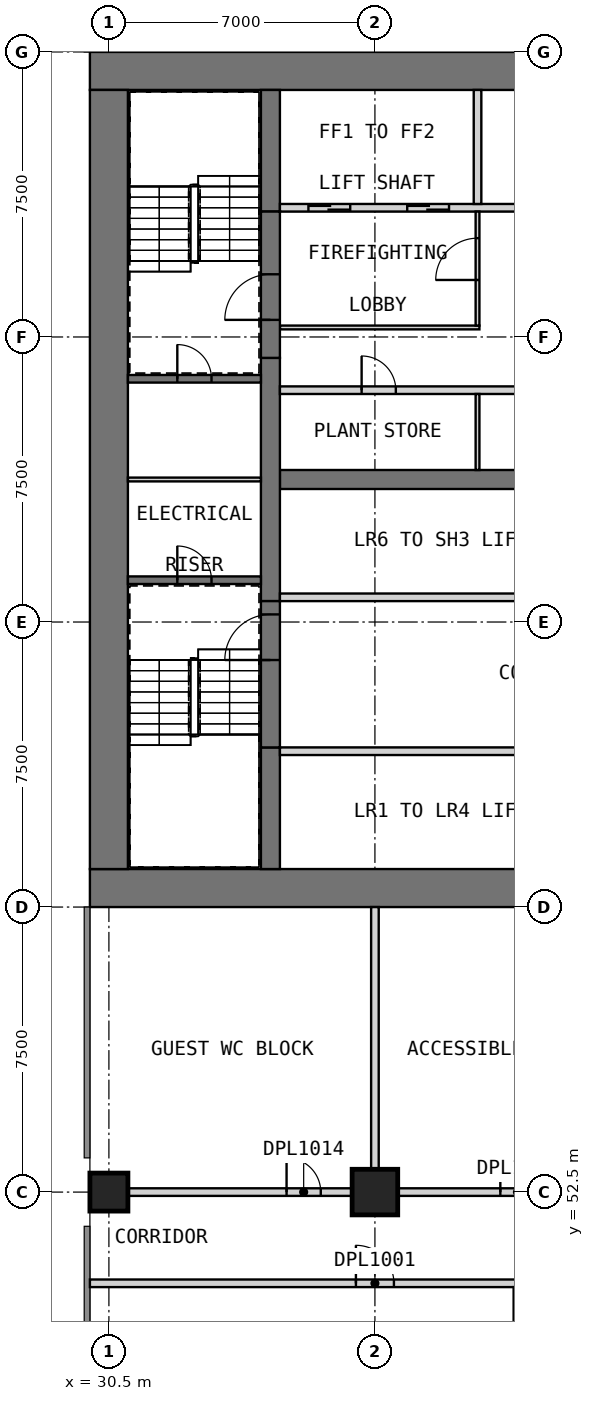
"""IFC4 building model, lengths in metres.
Left out: names, types, materials, properties, quantities, classifications, styles, units other than length and angle.
Written with IfcOpenShell. Run it as: python <this file> out.ifc"""

import sys

from ifc_helpers import new_model, si_unit, direction, frame, frame_2d, origin, origin_2d, place, context, subcontext, project, spatial, rectangle, extrude, element, fill, save


model = new_model("IFC4")
c1 = context("Model", 3, precision=1e-05, world=origin(), true_north=direction((0.0, 1.0)))
c2 = subcontext(c1, "Body", "Model", "MODEL_VIEW")
j1 = project(units=[si_unit("LENGTHUNIT", "METRE"), si_unit("PLANEANGLEUNIT", "RADIAN")], contexts=[c1])
p1 = place(None, origin())
s1 = spatial("IfcSite", under=j1, at=p1, CompositionType="ELEMENT")
p2 = place(p1, origin())
s2 = spatial("IfcBuilding", under=s1, at=p2, CompositionType="ELEMENT")
p3 = place(p2, frame((0.0, 0.0, 73.6)))
s3 = spatial("IfcBuildingStorey", under=s2, at=p3, CompositionType="ELEMENT", Elevation=73.6)
p4 = place(p3, frame((30.5, 52.5, 0.0), z_axis=(0.0, 0.0, 1.0), x_axis=(1.0, 0.0, 0.0)))
e1 = element("IfcColumn", 1, at=p4, inside=s3, PredefinedType="COLUMN", context=c2, shape_type="SweptSolid", body=[
    extrude(rectangle(XDim=1.0, YDim=1.0, at=origin_2d()), origin(), (0.0, 0.0, 1.0), 5.5),
])
p5 = place(p3, frame((37.5, 52.5, 0.0), z_axis=(0.0, 0.0, 1.0), x_axis=(1.0, 0.0, 0.0)))
e2 = element("IfcColumn", 2, at=p5, inside=s3, PredefinedType="COLUMN", context=c2, shape_type="SweptSolid", body=[
    extrude(rectangle(XDim=1.2, YDim=1.2, at=origin_2d()), origin(), (0.0, 0.0, 1.0), 5.5),
])
p6 = place(p3, frame((30.0, 60.5, 0.0), z_axis=(0.0, 0.0, 1.0), x_axis=(1.0, 0.0, 0.0)))
e3 = element("IfcWall", 3, at=p6, inside=s3, PredefinedType="SHEAR", context=c2, shape_type="SweptSolid", body=[
    extrude(rectangle(XDim=30.0, YDim=1.0, at=frame_2d((15.0, 0.0))), origin(), (0.0, 0.0, 1.0), 5.5),
])
p7 = place(p6, frame((21.9, 0.0, 0.0)))
e4 = element("IfcOpeningElement", 4, at=p7, cuts=e3, PredefinedType="OPENING", context=c2, shape_type="SweptSolid", body=[
    extrude(rectangle(XDim=1.8, YDim=2.1, at=frame_2d((0.9, 1.05))), frame((0.0, 0.51, 0.0), z_axis=(0.0, -1.0, 0.0), x_axis=(1.0, 0.0, 0.0)), (0.0, 0.0, 1.0), 1.02),
])
p8 = place(p6, frame((26.5, 0.0, 0.0)))
e5 = element("IfcOpeningElement", 5, at=p8, cuts=e3, PredefinedType="OPENING", context=c2, shape_type="SweptSolid", body=[
    extrude(rectangle(XDim=1.2, YDim=2.1, at=frame_2d((0.6, 1.05))), frame((0.0, 0.51, 0.0), z_axis=(0.0, -1.0, 0.0), x_axis=(1.0, 0.0, 0.0)), (0.0, 0.0, 1.0), 1.02),
])
p9 = place(p3, frame((30.0, 82.0, 0.0), z_axis=(0.0, 0.0, 1.0), x_axis=(1.0, 0.0, 0.0)))
e6 = element("IfcWall", 6, at=p9, inside=s3, PredefinedType="SHEAR", context=c2, shape_type="SweptSolid", body=[
    extrude(rectangle(XDim=30.0, YDim=1.0, at=frame_2d((15.0, 0.0))), origin(), (0.0, 0.0, 1.0), 5.5),
])
p10 = place(p3, frame((30.5, 61.0, 0.0), z_axis=(0.0, 0.0, 1.0), x_axis=(0.0, 1.0, 0.0)))
e7 = element("IfcWall", 7, at=p10, inside=s3, PredefinedType="SHEAR", context=c2, shape_type="SweptSolid", body=[
    extrude(rectangle(XDim=20.5, YDim=1.0, at=frame_2d((10.25, 0.0))), origin(), (0.0, 0.0, 1.0), 5.5),
])
p11 = place(p3, frame((35.0, 71.25, 0.0), z_axis=(0.0, 0.0, 1.0), x_axis=(1.0, 0.0, 0.0)))
e8 = element("IfcWall", 8, at=p11, inside=s3, PredefinedType="SHEAR", context=c2, shape_type="SweptSolid", body=[
    extrude(rectangle(XDim=15.6, YDim=0.5, at=frame_2d((7.8, 0.0))), origin(), (0.0, 0.0, 1.0), 5.5),
])
p12 = place(p3, frame((34.75, 61.0, 0.0), z_axis=(0.0, 0.0, 1.0), x_axis=(0.0, 1.0, 0.0)))
e9 = element("IfcWall", 9, at=p12, inside=s3, PredefinedType="SHEAR", context=c2, shape_type="SweptSolid", body=[
    extrude(rectangle(XDim=3.2, YDim=0.5, at=frame_2d((1.6, 0.0))), origin(), (0.0, 0.0, 1.0), 5.5),
])
p13 = place(p3, frame((34.75, 68.05, 0.0), z_axis=(0.0, 0.0, 1.0), x_axis=(0.0, 1.0, 0.0)))
e10 = element("IfcWall", 10, at=p13, inside=s3, PredefinedType="SHEAR", context=c2, shape_type="SweptSolid", body=[
    extrude(rectangle(XDim=6.4, YDim=0.5, at=frame_2d((3.2, 0.0))), origin(), (0.0, 0.0, 1.0), 5.5),
])
p14 = place(p3, frame((34.75, 78.3, 0.0), z_axis=(0.0, 0.0, 1.0), x_axis=(0.0, 1.0, 0.0)))
e11 = element("IfcWall", 11, at=p14, inside=s3, PredefinedType="SHEAR", context=c2, shape_type="SweptSolid", body=[
    extrude(rectangle(XDim=3.2, YDim=0.5, at=frame_2d((1.6, 0.0))), origin(), (0.0, 0.0, 1.0), 5.5),
])
p15 = place(p2, frame((0.0, 0.0, 34.0)))
s4 = spatial("IfcBuildingStorey", under=s2, at=p15, CompositionType="ELEMENT", Elevation=34.0)
for number, where, z_axis, x_axis in (
    (12, (29.7, 61.05, 0.0), (0.0, 0.0, 1.0), (0.0, 1.0, 0.0)),
    (13, (29.7, 65.925, 0.0), (0.0, 0.0, 1.0), (0.0, 1.0, 0.0)),
    (14, (29.7, 70.8, 0.0), (0.0, 0.0, 1.0), (0.0, 1.0, 0.0)),
    (15, (29.7, 75.675, 0.0), (0.0, 0.0, 1.0), (0.0, 1.0, 0.0)),
    (16, (29.7, 80.55, 0.0), (0.0, 0.0, 1.0), (0.0, 1.0, 0.0)),
):
    element("IfcWall", number, at=place(p15, frame(where, z_axis=z_axis, x_axis=x_axis)), inside=s4, PredefinedType="SOLIDWALL", context=c2, shape_type="SweptSolid", body=[
        extrude(rectangle(XDim=0.9, YDim=0.6, at=frame_2d((0.45, 0.0))), origin(), (0.0, 0.0, 1.0), 286.2),
    ])
for number, where, z_axis, x_axis in (
    (17, (35.0, 64.1, 0.0), (0.0, 0.0, 1.0), (1.0, 0.0, 0.0)),
    (18, (35.0, 68.15, 0.0), (0.0, 0.0, 1.0), (1.0, 0.0, 0.0)),
):
    element("IfcWall", number, at=place(p3, frame(where, z_axis=z_axis, x_axis=x_axis)), inside=s3, PredefinedType="SOLIDWALL", context=c2, shape_type="SweptSolid", body=[
        extrude(rectangle(XDim=13.0, YDim=0.2, at=frame_2d((6.5, 0.0))), origin(), (0.0, 0.0, 1.0), 5.5),
    ])
p16 = place(p3, frame((35.0, 73.6, 0.0), z_axis=(0.0, 0.0, 1.0), x_axis=(1.0, 0.0, 0.0)))
e19 = element("IfcWall", 19, at=p16, inside=s3, PredefinedType="PARTITIONING", context=c2, shape_type="SweptSolid", body=[
    extrude(rectangle(XDim=15.6, YDim=0.2, at=frame_2d((7.8, 0.0))), origin(), (0.0, 0.0, 1.0), 5.25),
])
p17 = place(p16, frame((2.15, 0.0, 0.0)))
e20 = element("IfcOpeningElement", 20, at=p17, cuts=e19, PredefinedType="OPENING", context=c2, shape_type="SweptSolid", body=[
    extrude(rectangle(XDim=0.9, YDim=2.1, at=frame_2d((0.45, 1.05))), frame((0.0, 0.11, 0.0), z_axis=(0.0, -1.0, 0.0), x_axis=(1.0, 0.0, 0.0)), (0.0, 0.0, 1.0), 0.22),
])
p18 = place(p16, frame((9.95, 0.0, 0.0)))
e21 = element("IfcOpeningElement", 21, at=p18, cuts=e19, PredefinedType="OPENING", context=c2, shape_type="SweptSolid", body=[
    extrude(rectangle(XDim=0.9, YDim=2.1, at=frame_2d((0.45, 1.05))), frame((0.0, 0.11, 0.0), z_axis=(0.0, -1.0, 0.0), x_axis=(1.0, 0.0, 0.0)), (0.0, 0.0, 1.0), 0.22),
])
p19 = place(p3, frame((40.2, 71.5, 0.0), z_axis=(0.0, 0.0, 1.0), x_axis=(0.0, 1.0, 0.0)))
e22 = element("IfcWall", 22, at=p19, inside=s3, PredefinedType="PARTITIONING", context=c2, shape_type="SweptSolid", body=[
    extrude(rectangle(XDim=2.0, YDim=0.1, at=frame_2d((1.0, 0.0))), origin(), (0.0, 0.0, 1.0), 5.25),
])
p20 = place(p3, frame((35.0, 78.4, 0.0), z_axis=(0.0, 0.0, 1.0), x_axis=(1.0, 0.0, 0.0)))
e23 = element("IfcWall", 23, at=p20, inside=s3, PredefinedType="SOLIDWALL", context=c2, shape_type="SweptSolid", body=[
    extrude(rectangle(XDim=15.6, YDim=0.2, at=frame_2d((7.8, 0.0))), origin(), (0.0, 0.0, 1.0), 5.5),
])
p21 = place(p20, frame((0.75, 0.0, 0.0)))
e24 = element("IfcOpeningElement", 24, at=p21, cuts=e23, PredefinedType="OPENING", context=c2, shape_type="SweptSolid", body=[
    extrude(rectangle(XDim=1.1, YDim=2.1, at=frame_2d((0.55, 1.05))), frame((0.0, 0.11, 0.0), z_axis=(0.0, -1.0, 0.0), x_axis=(1.0, 0.0, 0.0)), (0.0, 0.0, 1.0), 0.22),
])
p22 = place(p20, frame((3.35, 0.0, 0.0)))
e25 = element("IfcOpeningElement", 25, at=p22, cuts=e23, PredefinedType="OPENING", context=c2, shape_type="SweptSolid", body=[
    extrude(rectangle(XDim=1.1, YDim=2.1, at=frame_2d((0.55, 1.05))), frame((0.0, 0.11, 0.0), z_axis=(0.0, -1.0, 0.0), x_axis=(1.0, 0.0, 0.0)), (0.0, 0.0, 1.0), 0.22),
])
p23 = place(p20, frame((11.15, 0.0, 0.0)))
e26 = element("IfcOpeningElement", 26, at=p23, cuts=e23, PredefinedType="OPENING", context=c2, shape_type="SweptSolid", body=[
    extrude(rectangle(XDim=1.1, YDim=2.1, at=frame_2d((0.55, 1.05))), frame((0.0, 0.11, 0.0), z_axis=(0.0, -1.0, 0.0), x_axis=(1.0, 0.0, 0.0)), (0.0, 0.0, 1.0), 0.22),
])
p24 = place(p20, frame((13.75, 0.0, 0.0)))
e27 = element("IfcOpeningElement", 27, at=p24, cuts=e23, PredefinedType="OPENING", context=c2, shape_type="SweptSolid", body=[
    extrude(rectangle(XDim=1.1, YDim=2.1, at=frame_2d((0.55, 1.05))), frame((0.0, 0.11, 0.0), z_axis=(0.0, -1.0, 0.0), x_axis=(1.0, 0.0, 0.0)), (0.0, 0.0, 1.0), 0.22),
])
p25 = place(p3, frame((40.2, 78.5, 0.0), z_axis=(0.0, 0.0, 1.0), x_axis=(0.0, 1.0, 0.0)))
e28 = element("IfcWall", 28, at=p25, inside=s3, PredefinedType="SOLIDWALL", context=c2, shape_type="SweptSolid", body=[
    extrude(rectangle(XDim=3.0, YDim=0.2, at=frame_2d((1.5, 0.0))), origin(), (0.0, 0.0, 1.0), 5.5),
])
p26 = place(p3, frame((35.0, 75.25, 0.0), z_axis=(0.0, 0.0, 1.0), x_axis=(1.0, 0.0, 0.0)))
e29 = element("IfcWall", 29, at=p26, inside=s3, PredefinedType="PARTITIONING", context=c2, shape_type="SweptSolid", body=[
    extrude(rectangle(XDim=5.25, YDim=0.1, at=frame_2d((2.625, 0.0))), origin(), (0.0, 0.0, 1.0), 5.25),
])
p27 = place(p3, frame((40.2, 75.3, 0.0), z_axis=(0.0, 0.0, 1.0), x_axis=(0.0, 1.0, 0.0)))
e30 = element("IfcWall", 30, at=p27, inside=s3, PredefinedType="PARTITIONING", context=c2, shape_type="SweptSolid", body=[
    extrude(rectangle(XDim=3.0, YDim=0.1, at=frame_2d((1.5, 0.0))), origin(), (0.0, 0.0, 1.0), 5.25),
])
p28 = place(p27, frame((1.2, 0.0, 0.0)))
e31 = element("IfcOpeningElement", 31, at=p28, cuts=e30, PredefinedType="OPENING", context=c2, shape_type="SweptSolid", body=[
    extrude(rectangle(XDim=1.1, YDim=2.1, at=frame_2d((0.55, 1.05))), frame((0.0, 0.06, 0.0), z_axis=(0.0, -1.0, 0.0), x_axis=(1.0, 0.0, 0.0)), (0.0, 0.0, 1.0), 0.12),
])
p29 = place(p3, frame((34.75, 64.2, 0.0), z_axis=(0.0, 0.0, 1.0), x_axis=(0.0, 1.0, 0.0)))
e32 = element("IfcWall", 32, at=p29, inside=s3, PredefinedType="SOLIDWALL", context=c2, shape_type="SweptSolid", body=[
    extrude(rectangle(XDim=3.85, YDim=0.5, at=frame_2d((1.925, 0.0))), origin(), (0.0, 0.0, 1.0), 4.3),
])
p30 = place(p29, frame((2.3, 0.0, 0.0)))
e33 = element("IfcOpeningElement", 33, at=p30, cuts=e32, PredefinedType="OPENING", context=c2, shape_type="SweptSolid", body=[
    extrude(rectangle(XDim=1.2, YDim=2.1, at=frame_2d((0.6, 1.05))), frame((0.0, 0.26, 0.0), z_axis=(0.0, -1.0, 0.0), x_axis=(1.0, 0.0, 0.0)), (0.0, 0.0, 1.0), 0.52),
])
p31 = place(p3, frame((34.75, 74.45, 0.0), z_axis=(0.0, 0.0, 1.0), x_axis=(0.0, 1.0, 0.0)))
e34 = element("IfcWall", 34, at=p31, inside=s3, PredefinedType="SOLIDWALL", context=c2, shape_type="SweptSolid", body=[
    extrude(rectangle(XDim=3.85, YDim=0.5, at=frame_2d((1.925, 0.0))), origin(), (0.0, 0.0, 1.0), 4.3),
])
p32 = place(p31, frame((1.0, 0.0, 0.0)))
e35 = element("IfcOpeningElement", 35, at=p32, cuts=e34, PredefinedType="OPENING", context=c2, shape_type="SweptSolid", body=[
    extrude(rectangle(XDim=1.2, YDim=2.1, at=frame_2d((0.6, 1.05))), frame((0.0, 0.26, 0.0), z_axis=(0.0, -1.0, 0.0), x_axis=(1.0, 0.0, 0.0)), (0.0, 0.0, 1.0), 0.52),
])
p33 = place(p3, frame((31.0, 68.6, 0.0), z_axis=(0.0, 0.0, 1.0), x_axis=(1.0, 0.0, 0.0)))
e36 = element("IfcWall", 36, at=p33, inside=s3, PredefinedType="SOLIDWALL", context=c2, shape_type="SweptSolid", body=[
    extrude(rectangle(XDim=3.5, YDim=0.2, at=frame_2d((1.75, 0.0))), origin(), (0.0, 0.0, 1.0), 5.25),
])
p34 = place(p33, frame((1.3, 0.0, 0.0)))
e37 = element("IfcOpeningElement", 37, at=p34, cuts=e36, PredefinedType="OPENING", context=c2, shape_type="SweptSolid", body=[
    extrude(rectangle(XDim=0.9, YDim=2.1, at=frame_2d((0.45, 1.05))), frame((0.0, 0.11, 0.0), z_axis=(0.0, -1.0, 0.0), x_axis=(1.0, 0.0, 0.0)), (0.0, 0.0, 1.0), 0.22),
])
p35 = place(p3, frame((31.0, 73.9, 0.0), z_axis=(0.0, 0.0, 1.0), x_axis=(1.0, 0.0, 0.0)))
e38 = element("IfcWall", 38, at=p35, inside=s3, PredefinedType="SOLIDWALL", context=c2, shape_type="SweptSolid", body=[
    extrude(rectangle(XDim=3.5, YDim=0.2, at=frame_2d((1.75, 0.0))), origin(), (0.0, 0.0, 1.0), 5.25),
])
p36 = place(p35, frame((1.3, 0.0, 0.0)))
e39 = element("IfcOpeningElement", 39, at=p36, cuts=e38, PredefinedType="OPENING", context=c2, shape_type="SweptSolid", body=[
    extrude(rectangle(XDim=0.9, YDim=2.1, at=frame_2d((0.45, 1.05))), frame((0.0, 0.11, 0.0), z_axis=(0.0, -1.0, 0.0), x_axis=(1.0, 0.0, 0.0)), (0.0, 0.0, 1.0), 0.22),
])
p37 = place(p3, frame((31.0, 71.25, 0.0), z_axis=(0.0, 0.0, 1.0), x_axis=(1.0, 0.0, 0.0)))
e40 = element("IfcWall", 40, at=p37, inside=s3, PredefinedType="PARTITIONING", context=c2, shape_type="SweptSolid", body=[
    extrude(rectangle(XDim=3.5, YDim=0.1, at=frame_2d((1.75, 0.0))), origin(), (0.0, 0.0, 1.0), 5.25),
])
p38 = place(p3, frame((30.0, 50.1, 0.0), z_axis=(0.0, 0.0, 1.0), x_axis=(1.0, 0.0, 0.0)))
e41 = element("IfcWall", 41, at=p38, inside=s3, PredefinedType="PARTITIONING", context=c2, shape_type="SweptSolid", body=[
    extrude(rectangle(XDim=47.4, YDim=0.2, at=frame_2d((23.7, 0.0))), origin(), (0.0, 0.0, 1.0), 5.25),
])
p39 = place(p38, frame((7.0, 0.0, 0.0)))
e42 = element("IfcOpeningElement", 42, at=p39, cuts=e41, PredefinedType="OPENING", context=c2, shape_type="SweptSolid", body=[
    extrude(rectangle(XDim=1.0, YDim=2.1, at=frame_2d((0.5, 1.05))), frame((0.0, 0.11, 0.0), z_axis=(0.0, -1.0, 0.0), x_axis=(1.0, 0.0, 0.0)), (0.0, 0.0, 1.0), 0.22),
])
p40 = place(p38, frame((12.625, 0.0, 0.0)))
e43 = element("IfcOpeningElement", 43, at=p40, cuts=e41, PredefinedType="OPENING", context=c2, shape_type="SweptSolid", body=[
    extrude(rectangle(XDim=1.0, YDim=2.1, at=frame_2d((0.5, 1.05))), frame((0.0, 0.11, 0.0), z_axis=(0.0, -1.0, 0.0), x_axis=(1.0, 0.0, 0.0)), (0.0, 0.0, 1.0), 0.22),
])
p41 = place(p38, frame((18.25, 0.0, 0.0)))
e44 = element("IfcOpeningElement", 44, at=p41, cuts=e41, PredefinedType="OPENING", context=c2, shape_type="SweptSolid", body=[
    extrude(rectangle(XDim=1.0, YDim=2.1, at=frame_2d((0.5, 1.05))), frame((0.0, 0.11, 0.0), z_axis=(0.0, -1.0, 0.0), x_axis=(1.0, 0.0, 0.0)), (0.0, 0.0, 1.0), 0.22),
])
p42 = place(p38, frame((33.25, 0.0, 0.0)))
e45 = element("IfcOpeningElement", 45, at=p42, cuts=e41, PredefinedType="OPENING", context=c2, shape_type="SweptSolid", body=[
    extrude(rectangle(XDim=1.0, YDim=2.1, at=frame_2d((0.5, 1.05))), frame((0.0, 0.11, 0.0), z_axis=(0.0, -1.0, 0.0), x_axis=(1.0, 0.0, 0.0)), (0.0, 0.0, 1.0), 0.22),
])
p43 = place(p3, frame((30.0, 52.5, 0.0), z_axis=(0.0, 0.0, 1.0), x_axis=(1.0, 0.0, 0.0)))
e46 = element("IfcWall", 46, at=p43, inside=s3, PredefinedType="PARTITIONING", context=c2, shape_type="SweptSolid", body=[
    extrude(rectangle(XDim=20.9, YDim=0.2, at=frame_2d((10.45, 0.0))), origin(), (0.0, 0.0, 1.0), 5.25),
])
p44 = place(p43, frame((5.175, 0.0, 0.0)))
e47 = element("IfcOpeningElement", 47, at=p44, cuts=e46, PredefinedType="OPENING", context=c2, shape_type="SweptSolid", body=[
    extrude(rectangle(XDim=0.9, YDim=2.1, at=frame_2d((0.45, 1.05))), frame((0.0, 0.11, 0.0), z_axis=(0.0, -1.0, 0.0), x_axis=(1.0, 0.0, 0.0)), (0.0, 0.0, 1.0), 0.22),
])
p45 = place(p43, frame((10.8, 0.0, 0.0)))
e48 = element("IfcOpeningElement", 48, at=p45, cuts=e46, PredefinedType="OPENING", context=c2, shape_type="SweptSolid", body=[
    extrude(rectangle(XDim=0.9, YDim=2.1, at=frame_2d((0.45, 1.05))), frame((0.0, 0.11, 0.0), z_axis=(0.0, -1.0, 0.0), x_axis=(1.0, 0.0, 0.0)), (0.0, 0.0, 1.0), 0.22),
])
p46 = place(p43, frame((17.5, 0.0, 0.0)))
e49 = element("IfcOpeningElement", 49, at=p46, cuts=e46, PredefinedType="OPENING", context=c2, shape_type="SweptSolid", body=[
    extrude(rectangle(XDim=0.9, YDim=2.1, at=frame_2d((0.45, 1.05))), frame((0.0, 0.11, 0.0), z_axis=(0.0, -1.0, 0.0), x_axis=(1.0, 0.0, 0.0)), (0.0, 0.0, 1.0), 0.22),
])
p47 = place(p3, frame((37.5, 52.6, 0.0), z_axis=(0.0, 0.0, 1.0), x_axis=(0.0, 1.0, 0.0)))
e50 = element("IfcWall", 50, at=p47, inside=s3, PredefinedType="PARTITIONING", context=c2, shape_type="SweptSolid", body=[
    extrude(rectangle(XDim=7.4, YDim=0.2, at=frame_2d((3.7, 0.0))), origin(), (0.0, 0.0, 1.0), 5.25),
])
p48 = place(p17, origin())
e51 = element("IfcDoor", 51, at=p48, inside=s3, OperationType="SINGLE_SWING_LEFT", PredefinedType="DOOR", context=c2, shape_type="SweptSolid", body=[
    extrude(rectangle(XDim=0.9, YDim=2.1, at=frame_2d((0.45, 1.05))), frame((0.0, 0.025, 0.0), z_axis=(0.0, -1.0, 0.0), x_axis=(1.0, 0.0, 0.0)), (0.0, 0.0, 1.0), 0.05),
])
fill(e20, e51)
p49 = place(p21, origin())
e52 = element("IfcDoor", 52, at=p49, inside=s3, OperationType="DOUBLE_DOOR_SLIDING", PredefinedType="DOOR", context=c2, shape_type="SweptSolid", body=[
    extrude(rectangle(XDim=1.1, YDim=2.1, at=frame_2d((0.55, 1.05))), frame((0.0, 0.025, 0.0), z_axis=(0.0, -1.0, 0.0), x_axis=(1.0, 0.0, 0.0)), (0.0, 0.0, 1.0), 0.05),
])
fill(e24, e52)
p50 = place(p22, origin())
e53 = element("IfcDoor", 53, at=p50, inside=s3, OperationType="DOUBLE_DOOR_SLIDING", PredefinedType="DOOR", context=c2, shape_type="SweptSolid", body=[
    extrude(rectangle(XDim=1.1, YDim=2.1, at=frame_2d((0.55, 1.05))), frame((0.0, 0.025, 0.0), z_axis=(0.0, -1.0, 0.0), x_axis=(1.0, 0.0, 0.0)), (0.0, 0.0, 1.0), 0.05),
])
fill(e25, e53)
p51 = place(p28, origin())
e54 = element("IfcDoor", 54, at=p51, inside=s3, OperationType="SINGLE_SWING_LEFT", PredefinedType="DOOR", context=c2, shape_type="SweptSolid", body=[
    extrude(rectangle(XDim=1.1, YDim=2.1, at=frame_2d((0.55, 1.05))), frame((0.0, 0.025, 0.0), z_axis=(0.0, -1.0, 0.0), x_axis=(1.0, 0.0, 0.0)), (0.0, 0.0, 1.0), 0.05),
])
fill(e31, e54)
p52 = place(p30, origin())
e55 = element("IfcDoor", 55, at=p52, inside=s3, OperationType="SINGLE_SWING_LEFT", PredefinedType="DOOR", context=c2, shape_type="SweptSolid", body=[
    extrude(rectangle(XDim=1.2, YDim=2.1, at=frame_2d((0.6, 1.05))), frame((0.0, 0.025, 0.0), z_axis=(0.0, -1.0, 0.0), x_axis=(1.0, 0.0, 0.0)), (0.0, 0.0, 1.0), 0.05),
])
fill(e33, e55)
p53 = place(p32, origin())
e56 = element("IfcDoor", 56, at=p53, inside=s3, OperationType="SINGLE_SWING_RIGHT", PredefinedType="DOOR", context=c2, shape_type="SweptSolid", body=[
    extrude(rectangle(XDim=1.2, YDim=2.1, at=frame_2d((0.6, 1.05))), frame((0.0, 0.025, 0.0), z_axis=(0.0, -1.0, 0.0), x_axis=(1.0, 0.0, 0.0)), (0.0, 0.0, 1.0), 0.05),
])
fill(e35, e56)
p54 = place(p34, origin())
e57 = element("IfcDoor", 57, at=p54, inside=s3, OperationType="SINGLE_SWING_LEFT", PredefinedType="DOOR", context=c2, shape_type="SweptSolid", body=[
    extrude(rectangle(XDim=0.9, YDim=2.1, at=frame_2d((0.45, 1.05))), frame((0.0, 0.025, 0.0), z_axis=(0.0, -1.0, 0.0), x_axis=(1.0, 0.0, 0.0)), (0.0, 0.0, 1.0), 0.05),
])
fill(e37, e57)
p55 = place(p36, origin())
e58 = element("IfcDoor", 58, at=p55, inside=s3, OperationType="SINGLE_SWING_RIGHT", PredefinedType="DOOR", context=c2, shape_type="SweptSolid", body=[
    extrude(rectangle(XDim=0.9, YDim=2.1, at=frame_2d((0.45, 1.05))), frame((0.0, 0.025, 0.0), z_axis=(0.0, -1.0, 0.0), x_axis=(1.0, 0.0, 0.0)), (0.0, 0.0, 1.0), 0.05),
])
fill(e39, e58)
p56 = place(p39, origin())
e59 = element("IfcDoor", 59, at=p56, inside=s3, OperationType="SINGLE_SWING_RIGHT", PredefinedType="DOOR", context=c2, shape_type="SweptSolid", body=[
    extrude(rectangle(XDim=1.0, YDim=2.1, at=frame_2d((0.5, 1.05))), frame((0.0, 0.025, 0.0), z_axis=(0.0, -1.0, 0.0), x_axis=(1.0, 0.0, 0.0)), (0.0, 0.0, 1.0), 0.05),
])
fill(e42, e59)
p57 = place(p44, origin())
e60 = element("IfcDoor", 60, at=p57, inside=s3, OperationType="SINGLE_SWING_LEFT", PredefinedType="DOOR", context=c2, shape_type="SweptSolid", body=[
    extrude(rectangle(XDim=0.9, YDim=2.1, at=frame_2d((0.45, 1.05))), frame((0.0, 0.025, 0.0), z_axis=(0.0, -1.0, 0.0), x_axis=(1.0, 0.0, 0.0)), (0.0, 0.0, 1.0), 0.05),
])
fill(e47, e60)
p58 = place(p45, origin())
e61 = element("IfcDoor", 61, at=p58, inside=s3, OperationType="SINGLE_SWING_LEFT", PredefinedType="DOOR", context=c2, shape_type="SweptSolid", body=[
    extrude(rectangle(XDim=0.9, YDim=2.1, at=frame_2d((0.45, 1.05))), frame((0.0, 0.025, 0.0), z_axis=(0.0, -1.0, 0.0), x_axis=(1.0, 0.0, 0.0)), (0.0, 0.0, 1.0), 0.05),
])
fill(e48, e61)
save(model, sys.argv[1])
